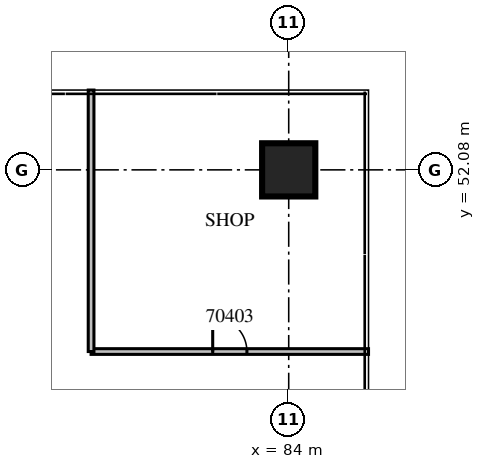
"""IFC4 building model, lengths in metres.
Left out: names, types, materials, properties, quantities, classifications, styles, units other than length and angle.
Written with IfcOpenShell. Run it as: python <this file> out.ifc"""

import sys

from ifc_helpers import new_model, si_unit, direction, frame, frame_2d, origin, origin_2d, place, context, subcontext, project, spatial, rectangle, extrude, source, transform, mapped, element, fill, save


model = new_model("IFC4")
c1 = context("Model", 3, precision=1e-05, world=origin(), true_north=direction((0.0, 1.0)))
c2 = subcontext(c1, "Body", "Model", "MODEL_VIEW")
j1 = project(units=[si_unit("LENGTHUNIT", "METRE"), si_unit("PLANEANGLEUNIT", "RADIAN")], contexts=[c1])
p1 = place(None, origin())
s1 = spatial("IfcSite", under=j1, at=p1, CompositionType="ELEMENT")
p2 = place(p1, origin())
s2 = spatial("IfcBuilding", under=s1, at=p2, CompositionType="ELEMENT")
p3 = place(p2, frame((0.0, 0.0, 7.5)))
s3 = spatial("IfcBuildingStorey", under=s2, at=p3, CompositionType="ELEMENT", Elevation=7.5)
m1 = source(origin(), c2, "Body", "SweptSolid", [
    extrude(rectangle(XDim=1.4, YDim=1.4, at=origin_2d()), origin(), (0.0, 0.0, 1.0), 5.4),
])
p4 = place(p3, frame((84.0, 52.08, 0.0), z_axis=(0.0, 0.0, 1.0), x_axis=(1.0, 0.0, 0.0)))
e1 = element("IfcColumn", 1, at=p4, inside=s3, PredefinedType="COLUMN", context=c2, shape_type="MappedRepresentation", body=[
    mapped(m1, transform((0.0, 0.0, 0.0), scale=1.0)),
])
m2 = source(origin(), c2, "Body", "SweptSolid", [
    extrude(rectangle(XDim=7.3, YDim=0.15, at=frame_2d((3.65, 0.0))), origin(), (0.0, 0.0, 1.0), 4.8),
])
p5 = place(p3, frame((78.8, 47.3, 0.0), z_axis=(0.0, 0.0, 1.0), x_axis=(1.0, 0.0, 0.0)))
e2 = element("IfcWall", 2, at=p5, inside=s3, PredefinedType="PARTITIONING", context=c2, shape_type="MappedRepresentation", body=[
    mapped(m2, transform((0.0, 0.0, 0.0), scale=1.0)),
])
m3 = source(origin(), c2, "Body", "SweptSolid", [
    extrude(rectangle(XDim=0.9, YDim=2.1, at=frame_2d((0.45, 1.05))), frame((0.0, 0.085, 0.0), z_axis=(0.0, -1.0, 0.0), x_axis=(1.0, 0.0, 0.0)), (0.0, 0.0, 1.0), 0.17),
])
p6 = place(p5, frame((3.2, 0.0, 0.0)))
e3 = element("IfcOpeningElement", 3, at=p6, cuts=e2, PredefinedType="OPENING", context=c2, shape_type="MappedRepresentation", body=[
    mapped(m3, transform((0.0, 0.0, 0.0), scale=1.0)),
])
m4 = source(origin(), c2, "Body", "SweptSolid", [
    extrude(rectangle(XDim=6.88, YDim=0.15, at=frame_2d((3.44, 0.0))), origin(), (0.0, 0.0, 1.0), 4.8),
])
p7 = place(p3, frame((78.8, 47.3, 0.0), z_axis=(0.0, 0.0, 1.0), x_axis=(0.0, 1.0, 0.0)))
e4 = element("IfcWall", 4, at=p7, inside=s3, PredefinedType="PARTITIONING", context=c2, shape_type="MappedRepresentation", body=[
    mapped(m4, transform((0.0, 0.0, 0.0), scale=1.0)),
])
m5 = source(origin(), c2, "Body", "SweptSolid", [
    extrude(rectangle(XDim=0.9, YDim=2.1, at=frame_2d((0.45, 1.05))), frame((0.0, 0.025, 0.0), z_axis=(0.0, -1.0, 0.0), x_axis=(1.0, 0.0, 0.0)), (0.0, 0.0, 1.0), 0.05),
])
p8 = place(p6, origin())
e5 = element("IfcDoor", 5, at=p8, inside=s3, OperationType="SINGLE_SWING_LEFT", PredefinedType="DOOR", context=c2, shape_type="MappedRepresentation", body=[
    mapped(m5, transform((0.0, 0.0, 0.0), scale=1.0)),
])
fill(e3, e5)
save(model, sys.argv[1])
